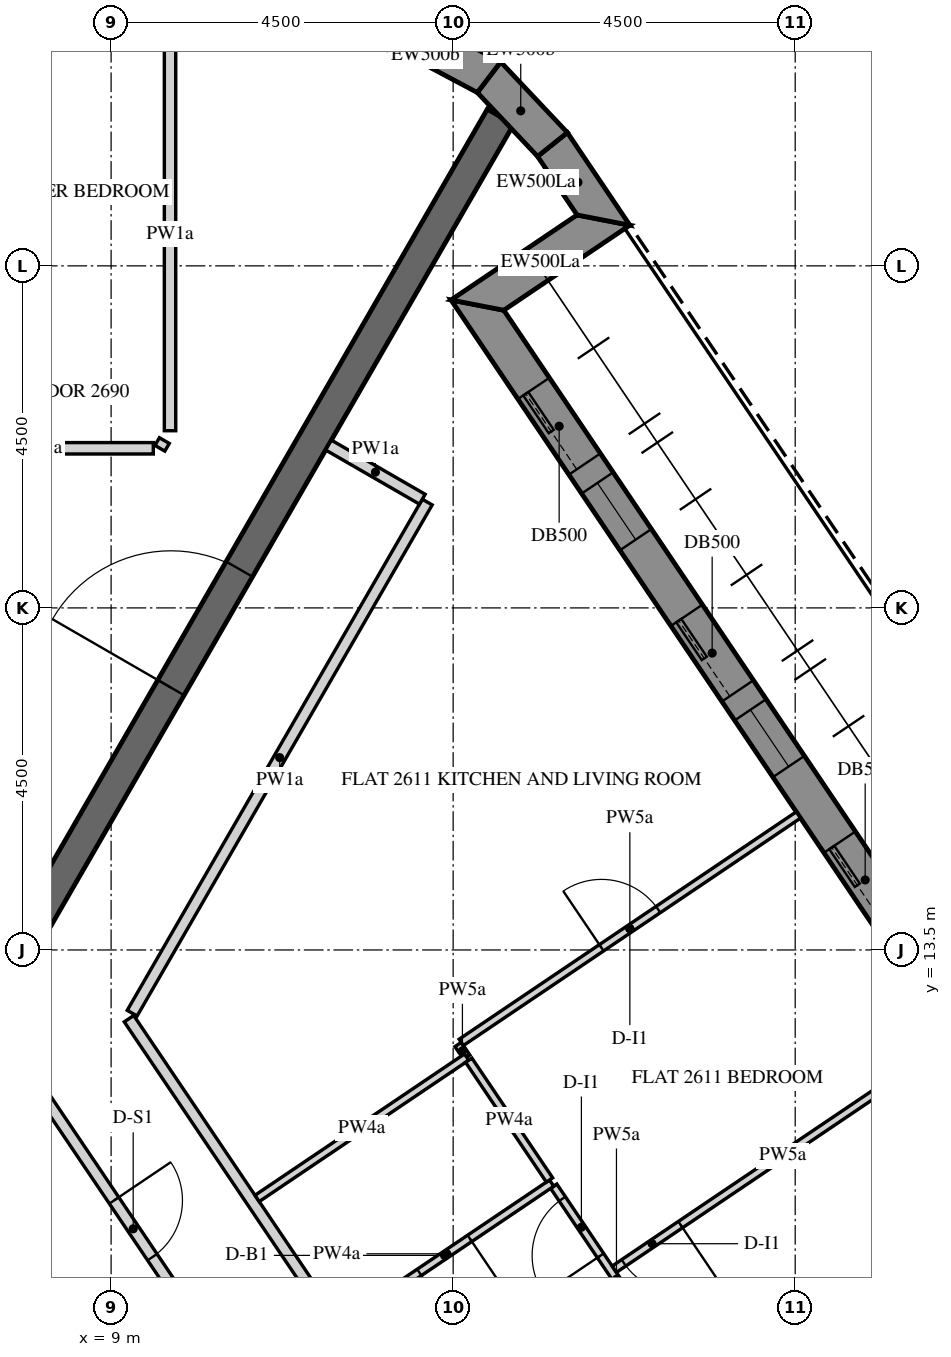
"""IFC4 building model, lengths in metres.
Left out: names, types, materials, properties, quantities, classifications, styles, units other than length and angle.
Written with IfcOpenShell. Run it as: python <this file> out.ifc"""

import sys

from ifc_helpers import new_model, si_unit, direction, frame, frame_2d, origin, place, context, subcontext, project, spatial, polyline, rectangle, outline, extrude, element, fill, save


model = new_model("IFC4")
c1 = context("Model", 3, precision=1e-05, world=origin(), true_north=direction((0.0, 1.0)))
c2 = subcontext(c1, "Body", "Model", "MODEL_VIEW")
j1 = project(units=[si_unit("LENGTHUNIT", "METRE"), si_unit("PLANEANGLEUNIT", "RADIAN")], contexts=[c1])
p1 = place(None, origin())
s1 = spatial("IfcSite", under=j1, at=p1, CompositionType="ELEMENT")
p2 = place(p1, origin())
s2 = spatial("IfcBuilding", under=s1, at=p2, CompositionType="ELEMENT")
p3 = place(p2, frame((0.0, 0.0, 334.2)))
s3 = spatial("IfcBuildingStorey", under=s2, at=p3, CompositionType="ELEMENT", Elevation=334.2)
p4 = place(p3, frame((26.706, 2.879, -0.15), z_axis=(0.0, 0.0, 1.0), x_axis=(-0.559197891507, 0.829034208061, 0.0)))
e1 = element("IfcWall", 1, at=p4, inside=s3, PredefinedType="SOLIDWALL", context=c2, shape_type="SweptSolid", body=[
    extrude(outline(polyline([(0.25, -0.25), (22.795, -0.25), (23.295, 0.25), (-0.25, 0.25), (0.25, -0.25)])), origin(), (0.0, 0.0, 1.0), 3.75),
])
p5 = place(p4, frame((1.323, 0.0, 1.05)))
e2 = element("IfcOpeningElement", 2, at=p5, cuts=e1, PredefinedType="OPENING", context=c2, shape_type="SweptSolid", body=[
    extrude(rectangle(XDim=0.9, YDim=1.5, at=frame_2d((0.45, 0.75))), frame((0.0, 0.26, 0.0), z_axis=(0.0, -1.0, 0.0), x_axis=(1.0, 0.0, 0.0)), (0.0, 0.0, 1.0), 0.52),
])
p6 = place(p4, frame((2.522, 0.0, 0.15)))
e3 = element("IfcOpeningElement", 3, at=p6, cuts=e1, PredefinedType="OPENING", context=c2, shape_type="SweptSolid", body=[
    extrude(rectangle(XDim=1.2, YDim=2.4, at=frame_2d((0.6, 1.2))), frame((0.0, 0.26, 0.0), z_axis=(0.0, -1.0, 0.0), x_axis=(1.0, 0.0, 0.0)), (0.0, 0.0, 1.0), 0.52),
])
p7 = place(p4, frame((4.922, 0.0, 1.05)))
e4 = element("IfcOpeningElement", 4, at=p7, cuts=e1, PredefinedType="OPENING", context=c2, shape_type="SweptSolid", body=[
    extrude(rectangle(XDim=0.9, YDim=1.5, at=frame_2d((0.45, 0.75))), frame((0.0, 0.26, 0.0), z_axis=(0.0, -1.0, 0.0), x_axis=(1.0, 0.0, 0.0)), (0.0, 0.0, 1.0), 0.52),
])
p8 = place(p4, frame((6.122, 0.0, 0.15)))
e5 = element("IfcOpeningElement", 5, at=p8, cuts=e1, PredefinedType="OPENING", context=c2, shape_type="SweptSolid", body=[
    extrude(rectangle(XDim=1.2, YDim=2.4, at=frame_2d((0.6, 1.2))), frame((0.0, 0.26, 0.0), z_axis=(0.0, -1.0, 0.0), x_axis=(1.0, 0.0, 0.0)), (0.0, 0.0, 1.0), 0.52),
])
p9 = place(p4, frame((8.522, 0.0, 1.05)))
e6 = element("IfcOpeningElement", 6, at=p9, cuts=e1, PredefinedType="OPENING", context=c2, shape_type="SweptSolid", body=[
    extrude(rectangle(XDim=0.9, YDim=1.5, at=frame_2d((0.45, 0.75))), frame((0.0, 0.26, 0.0), z_axis=(0.0, -1.0, 0.0), x_axis=(1.0, 0.0, 0.0)), (0.0, 0.0, 1.0), 0.52),
])
p10 = place(p4, frame((9.722, 0.0, 0.15)))
e7 = element("IfcOpeningElement", 7, at=p10, cuts=e1, PredefinedType="OPENING", context=c2, shape_type="SweptSolid", body=[
    extrude(rectangle(XDim=1.2, YDim=2.4, at=frame_2d((0.6, 1.2))), frame((0.0, 0.26, 0.0), z_axis=(0.0, -1.0, 0.0), x_axis=(1.0, 0.0, 0.0)), (0.0, 0.0, 1.0), 0.52),
])
p11 = place(p4, frame((12.122, 0.0, 1.05)))
e8 = element("IfcOpeningElement", 8, at=p11, cuts=e1, PredefinedType="OPENING", context=c2, shape_type="SweptSolid", body=[
    extrude(rectangle(XDim=0.9, YDim=1.5, at=frame_2d((0.45, 0.75))), frame((0.0, 0.26, 0.0), z_axis=(0.0, -1.0, 0.0), x_axis=(1.0, 0.0, 0.0)), (0.0, 0.0, 1.0), 0.52),
])
p12 = place(p4, frame((13.323, 0.0, 0.15)))
e9 = element("IfcOpeningElement", 9, at=p12, cuts=e1, PredefinedType="OPENING", context=c2, shape_type="SweptSolid", body=[
    extrude(rectangle(XDim=1.2, YDim=2.4, at=frame_2d((0.6, 1.2))), frame((0.0, 0.26, 0.0), z_axis=(0.0, -1.0, 0.0), x_axis=(1.0, 0.0, 0.0)), (0.0, 0.0, 1.0), 0.52),
])
p13 = place(p4, frame((15.722, 0.0, 1.05)))
e10 = element("IfcOpeningElement", 10, at=p13, cuts=e1, PredefinedType="OPENING", context=c2, shape_type="SweptSolid", body=[
    extrude(rectangle(XDim=0.9, YDim=1.5, at=frame_2d((0.45, 0.75))), frame((0.0, 0.26, 0.0), z_axis=(0.0, -1.0, 0.0), x_axis=(1.0, 0.0, 0.0)), (0.0, 0.0, 1.0), 0.52),
])
p14 = place(p4, frame((16.922, 0.0, 0.15)))
e11 = element("IfcOpeningElement", 11, at=p14, cuts=e1, PredefinedType="OPENING", context=c2, shape_type="SweptSolid", body=[
    extrude(rectangle(XDim=1.2, YDim=2.4, at=frame_2d((0.6, 1.2))), frame((0.0, 0.26, 0.0), z_axis=(0.0, -1.0, 0.0), x_axis=(1.0, 0.0, 0.0)), (0.0, 0.0, 1.0), 0.52),
])
p15 = place(p4, frame((19.323, 0.0, 1.05)))
e12 = element("IfcOpeningElement", 12, at=p15, cuts=e1, PredefinedType="OPENING", context=c2, shape_type="SweptSolid", body=[
    extrude(rectangle(XDim=0.9, YDim=1.5, at=frame_2d((0.45, 0.75))), frame((0.0, 0.26, 0.0), z_axis=(0.0, -1.0, 0.0), x_axis=(1.0, 0.0, 0.0)), (0.0, 0.0, 1.0), 0.52),
])
p16 = place(p4, frame((20.522, 0.0, 0.15)))
e13 = element("IfcOpeningElement", 13, at=p16, cuts=e1, PredefinedType="OPENING", context=c2, shape_type="SweptSolid", body=[
    extrude(rectangle(XDim=1.2, YDim=2.4, at=frame_2d((0.6, 1.2))), frame((0.0, 0.26, 0.0), z_axis=(0.0, -1.0, 0.0), x_axis=(1.0, 0.0, 0.0)), (0.0, 0.0, 1.0), 0.52),
])
p17 = place(p3, frame((13.819, 21.984, -0.15), z_axis=(0.0, 0.0, 1.0), x_axis=(0.829052389485, 0.559170935841, 0.0)))
e14 = element("IfcWall", 14, at=p17, inside=s3, PredefinedType="SOLIDWALL", context=c2, shape_type="SweptSolid", body=[
    extrude(outline(polyline([(0.25, -0.25), (2.25, -0.25), (1.75, 0.25), (-0.25, 0.25), (0.25, -0.25)])), origin(), (0.0, 0.0, 1.0), 3.75),
])
p18 = place(p3, frame((15.478, 23.102, -0.15), z_axis=(0.0, 0.0, 1.0), x_axis=(-0.559245726333, 0.829001940636, 0.0)))
e15 = element("IfcWall", 15, at=p18, inside=s3, PredefinedType="SOLIDWALL", context=c2, shape_type="SweptSolid", body=[
    extrude(outline(polyline([(-0.25, -0.25), (1.221, -0.25), (1.18, 0.25), (0.25, 0.25), (-0.25, -0.25)])), origin(), (0.0, 0.0, 1.0), 3.75),
])
p19 = place(p3, frame((14.806, 24.097, -0.15), z_axis=(0.0, 0.0, 1.0), x_axis=(-0.686234452793, 0.727380420275, 0.0)))
e16 = element("IfcWall", 16, at=p19, inside=s3, PredefinedType="SOLIDWALL", context=c2, shape_type="SweptSolid", body=[
    extrude(outline(polyline([(-0.021, -0.25), (1.257, -0.25), (1.175, 0.25), (0.021, 0.25), (-0.021, -0.25)])), origin(), (0.0, 0.0, 1.0), 3.75),
])
p20 = place(p3, frame((13.972, 24.982, -0.15), z_axis=(0.0, 0.0, 1.0), x_axis=(-0.882902492938, 0.469556373575, 0.0)))
e17 = element("IfcWall", 17, at=p20, inside=s3, PredefinedType="SOLIDWALL", context=c2, shape_type="SweptSolid", body=[
    extrude(outline(polyline([(-0.041, -0.25), (1.257, -0.25), (1.175, 0.25), (0.041, 0.25), (-0.041, -0.25)])), origin(), (0.0, 0.0, 1.0), 3.75),
])
p21 = place(p3, frame((12.471, 0.0, -0.15), z_axis=(0.0, 0.0, 1.0), x_axis=(-0.499996419489, 0.866027470984, 0.0)))
e18 = element("IfcWall", 18, at=p21, inside=s3, PredefinedType="SHEAR", context=c2, shape_type="SweptSolid", body=[
    extrude(outline(polyline([(-0.115, -0.2), (12.586, -0.2), (12.355, 0.2), (0.115, 0.2), (-0.115, -0.2)])), origin(), (0.0, 0.0, 1.0), 3.75),
])
p22 = place(p21, frame((5.306, 0.0, 0.15)))
e19 = element("IfcOpeningElement", 19, at=p22, cuts=e18, PredefinedType="OPENING", context=c2, shape_type="SweptSolid", body=[
    extrude(rectangle(XDim=1.8, YDim=2.4, at=frame_2d((0.9, 1.2))), frame((0.0, 0.21, 0.0), z_axis=(0.0, -1.0, 0.0), x_axis=(1.0, 0.0, 0.0)), (0.0, 0.0, 1.0), 0.42),
])
p23 = place(p3, frame((6.351, 11.0, -0.15), z_axis=(0.0, 0.0, 1.0), x_axis=(0.499998894578, 0.866026041999, 0.0)))
e20 = element("IfcWall", 20, at=p23, inside=s3, PredefinedType="SHEAR", context=c2, shape_type="SweptSolid", body=[
    extrude(rectangle(XDim=15.544, YDim=0.4, at=frame_2d((7.772, 0.0))), origin(), (0.0, 0.0, 1.0), 3.75),
])
p24 = place(p23, frame((6.872, 0.0, 0.15)))
e21 = element("IfcOpeningElement", 21, at=p24, cuts=e20, PredefinedType="OPENING", context=c2, shape_type="SweptSolid", body=[
    extrude(rectangle(XDim=1.8, YDim=2.4, at=frame_2d((0.9, 1.2))), frame((0.0, 0.21, 0.0), z_axis=(0.0, -1.0, 0.0), x_axis=(1.0, 0.0, 0.0)), (0.0, 0.0, 1.0), 0.42),
])
p25 = place(p3, frame((9.775, 25.5, 0.0), z_axis=(0.0, 0.0, 1.0), x_axis=(0.0, -1.0, 0.0)))
e22 = element("IfcWall", 22, at=p25, inside=s3, PredefinedType="PARTITIONING", context=c2, shape_type="SweptSolid", body=[
    extrude(rectangle(XDim=5.169, YDim=0.15, at=frame_2d((2.584, 0.0))), origin(), (0.0, 0.0, 1.0), 2.838),
])
p26 = place(p3, frame((9.7, 20.201, 0.0), z_axis=(0.0, 0.0, 1.0), x_axis=(-0.49996389635, -0.866046247233, 0.0)))
e23 = element("IfcWall", 23, at=p26, inside=s3, PredefinedType="PARTITIONING", context=c2, shape_type="SweptSolid", body=[
    extrude(rectangle(XDim=0.117, YDim=0.15, at=frame_2d((0.058, 0.0))), origin(), (0.0, 0.0, 1.0), 2.838),
])
p27 = place(p3, frame((9.555, 20.1, 0.0), z_axis=(0.0, 0.0, 1.0), x_axis=(-1.0, 0.0, 0.0)))
e24 = element("IfcWall", 24, at=p27, inside=s3, PredefinedType="PARTITIONING", context=c2, shape_type="SweptSolid", body=[
    extrude(rectangle(XDim=3.017, YDim=0.15, at=frame_2d((1.508, 0.0))), origin(), (0.0, 0.0, 1.0), 2.838),
])
p28 = place(p3, frame((18.521, -1.171, 0.0), z_axis=(0.0, 0.0, 1.0), x_axis=(-0.559191021435, 0.829038842001, 0.0)))
e25 = element("IfcWall", 25, at=p28, inside=s3, PredefinedType="PARTITIONING", context=c2, shape_type="SweptSolid", body=[
    extrude(rectangle(XDim=16.605, YDim=0.15, at=frame_2d((8.303, 0.0))), origin(), (0.0, 0.0, 1.0), 2.838),
])
p29 = place(p28, frame((9.703, 0.0, 0.0)))
e26 = element("IfcOpeningElement", 26, at=p29, cuts=e25, PredefinedType="OPENING", context=c2, shape_type="SweptSolid", body=[
    extrude(rectangle(XDim=1.0, YDim=2.1, at=frame_2d((0.5, 1.05))), frame((0.0, 0.085, 0.0), z_axis=(0.0, -1.0, 0.0), x_axis=(1.0, 0.0, 0.0)), (0.0, 0.0, 1.0), 0.17),
])
p30 = place(p3, frame((9.277, 12.668, 0.0), z_axis=(0.0, 0.0, 1.0), x_axis=(0.499991012162, 0.866030592853, 0.0)))
e27 = element("IfcWall", 27, at=p30, inside=s3, PredefinedType="PARTITIONING", context=c2, shape_type="SweptSolid", body=[
    extrude(rectangle(XDim=7.764, YDim=0.15, at=frame_2d((3.882, 0.0))), origin(), (0.0, 0.0, 1.0), 2.838),
])
p31 = place(p3, frame((13.094, 19.43, 0.0), z_axis=(0.0, 0.0, 1.0), x_axis=(-0.866062911188, 0.499935029643, 0.0)))
e28 = element("IfcWall", 28, at=p31, inside=s3, PredefinedType="PARTITIONING", context=c2, shape_type="SweptSolid", body=[
    extrude(rectangle(XDim=1.425, YDim=0.15, at=frame_2d((0.712, 0.0))), origin(), (0.0, 0.0, 1.0), 2.838),
])
p32 = place(p3, frame((7.694, 12.199, 0.0), z_axis=(0.0, 0.0, 1.0), x_axis=(0.55920112739, -0.829032025392, 0.0)))
e29 = element("IfcWall", 29, at=p32, inside=s3, PredefinedType="PARTITIONING", context=c2, shape_type="SweptSolid", body=[
    extrude(rectangle(XDim=5.71, YDim=0.15, at=frame_2d((2.855, 0.0))), origin(), (0.0, 0.0, 1.0), 2.838),
])
p33 = place(p32, frame((2.405, 0.0, 0.0)))
e30 = element("IfcOpeningElement", 30, at=p33, cuts=e29, PredefinedType="OPENING", context=c2, shape_type="SweptSolid", body=[
    extrude(rectangle(XDim=0.9, YDim=2.1, at=frame_2d((0.45, 1.05))), frame((0.0, 0.085, 0.0), z_axis=(0.0, -1.0, 0.0), x_axis=(1.0, 0.0, 0.0)), (0.0, 0.0, 1.0), 0.17),
])
p34 = place(p3, frame((22.069, 9.307, 0.0), z_axis=(0.0, 0.0, 1.0), x_axis=(-0.829040270775, -0.559188903174, 0.0)))
e31 = element("IfcWall", 31, at=p34, inside=s3, PredefinedType="PARTITIONING", context=c2, shape_type="SweptSolid", body=[
    extrude(rectangle(XDim=8.758, YDim=0.18, at=frame_2d((4.379, 0.0))), origin(), (0.0, 0.0, 1.0), 2.838),
])
p35 = place(p3, frame((13.678, 12.089, 0.0), z_axis=(0.0, 0.0, 1.0), x_axis=(-0.559431350648, 0.828876688001, 0.0)))
e32 = element("IfcWall", 32, at=p35, inside=s3, PredefinedType="PARTITIONING", context=c2, shape_type="SweptSolid", body=[
    extrude(rectangle(XDim=0.202, YDim=0.1, at=frame_2d((0.101, 0.0))), origin(), (0.0, 0.0, 1.0), 2.838),
])
p36 = place(p3, frame((13.607, 12.284, 0.0), z_axis=(0.0, 0.0, 1.0), x_axis=(0.829033261565, 0.559199294722, 0.0)))
e33 = element("IfcWall", 33, at=p36, inside=s3, PredefinedType="PARTITIONING", context=c2, shape_type="SweptSolid", body=[
    extrude(rectangle(XDim=5.35, YDim=0.1, at=frame_2d((2.675, 0.0))), origin(), (0.0, 0.0, 1.0), 2.838),
])
p37 = place(p36, frame((2.225, 0.0, 0.0)))
e34 = element("IfcOpeningElement", 34, at=p37, cuts=e33, PredefinedType="OPENING", context=c2, shape_type="SweptSolid", body=[
    extrude(rectangle(XDim=0.9, YDim=2.1, at=frame_2d((0.45, 1.05))), frame((0.0, 0.06, 0.0), z_axis=(0.0, -1.0, 0.0), x_axis=(1.0, 0.0, 0.0)), (0.0, 0.0, 1.0), 0.12),
])
p38 = place(p3, frame((10.921, 10.231, 0.0), z_axis=(0.0, 0.0, 1.0), x_axis=(0.829010378124, 0.559233218759, 0.0)))
e35 = element("IfcWall", 35, at=p38, inside=s3, PredefinedType="PARTITIONING", context=c2, shape_type="SweptSolid", body=[
    extrude(rectangle(XDim=3.325, YDim=0.1, at=frame_2d((1.663, 0.0))), origin(), (0.0, 0.0, 1.0), 2.838),
])
p39 = place(p3, frame((16.474, 7.944, 0.0), z_axis=(0.0, 0.0, 1.0), x_axis=(-0.559193191328, 0.829037378393, 0.0)))
e36 = element("IfcWall", 36, at=p39, inside=s3, PredefinedType="PARTITIONING", context=c2, shape_type="SweptSolid", body=[
    extrude(rectangle(XDim=2.954, YDim=0.1, at=frame_2d((1.477, 0.0))), origin(), (0.0, 0.0, 1.0), 2.838),
])
p40 = place(p39, frame((0.502, 0.0, 0.0)))
e37 = element("IfcOpeningElement", 37, at=p40, cuts=e36, PredefinedType="OPENING", context=c2, shape_type="SweptSolid", body=[
    extrude(rectangle(XDim=0.9, YDim=2.1, at=frame_2d((0.45, 1.05))), frame((0.0, 0.06, 0.0), z_axis=(0.0, -1.0, 0.0), x_axis=(1.0, 0.0, 0.0)), (0.0, 0.0, 1.0), 0.12),
])
p41 = place(p39, frame((1.852, 0.0, 0.0)))
e38 = element("IfcOpeningElement", 38, at=p41, cuts=e36, PredefinedType="OPENING", context=c2, shape_type="SweptSolid", body=[
    extrude(rectangle(XDim=0.9, YDim=2.1, at=frame_2d((0.45, 1.05))), frame((0.0, 0.06, 0.0), z_axis=(0.0, -1.0, 0.0), x_axis=(1.0, 0.0, 0.0)), (0.0, 0.0, 1.0), 0.12),
])
p42 = place(p3, frame((14.796, 10.433, 0.0), z_axis=(0.0, 0.0, 1.0), x_axis=(-0.82903334026, -0.559199178055, 0.0)))
e39 = element("IfcWall", 39, at=p42, inside=s3, PredefinedType="PARTITIONING", context=c2, shape_type="SweptSolid", body=[
    extrude(rectangle(XDim=3.325, YDim=0.1, at=frame_2d((1.663, 0.0))), origin(), (0.0, 0.0, 1.0), 2.838),
])
p43 = place(p42, frame((1.3, 0.0, 0.0)))
e40 = element("IfcOpeningElement", 40, at=p43, cuts=e39, PredefinedType="OPENING", context=c2, shape_type="SweptSolid", body=[
    extrude(rectangle(XDim=0.8, YDim=2.1, at=frame_2d((0.4, 1.05))), frame((0.0, 0.06, 0.0), z_axis=(0.0, -1.0, 0.0), x_axis=(1.0, 0.0, 0.0)), (0.0, 0.0, 1.0), 0.12),
])
p44 = place(p3, frame((20.055, 12.292, 0.0), z_axis=(0.0, 0.0, 1.0), x_axis=(-0.829033261565, -0.559199294722, 0.0)))
e41 = element("IfcWall", 41, at=p44, inside=s3, PredefinedType="PARTITIONING", context=c2, shape_type="SweptSolid", body=[
    extrude(rectangle(XDim=5.35, YDim=0.1, at=frame_2d((2.675, 0.0))), origin(), (0.0, 0.0, 1.0), 2.838),
])
p45 = place(p44, frame((4.3, 0.0, 0.0)))
e42 = element("IfcOpeningElement", 42, at=p45, cuts=e41, PredefinedType="OPENING", context=c2, shape_type="SweptSolid", body=[
    extrude(rectangle(XDim=0.9, YDim=2.1, at=frame_2d((0.45, 1.05))), frame((0.0, 0.06, 0.0), z_axis=(0.0, -1.0, 0.0), x_axis=(1.0, 0.0, 0.0)), (0.0, 0.0, 1.0), 0.12),
])
p46 = place(p3, frame((13.705, 12.049, 0.0), z_axis=(0.0, 0.0, 1.0), x_axis=(0.559199178055, -0.82903334026, 0.0)))
e43 = element("IfcWall", 43, at=p46, inside=s3, PredefinedType="PARTITIONING", context=c2, shape_type="SweptSolid", body=[
    extrude(rectangle(XDim=1.9, YDim=0.1, at=frame_2d((0.95, 0.0))), origin(), (0.0, 0.0, 1.0), 2.838),
])
p47 = place(p12, frame((0.0, 0.175, 0.0)))
e44 = element("IfcDoor", 44, at=p47, inside=s3, OperationType="SLIDING_TO_LEFT", PredefinedType="DOOR", context=c2, shape_type="SweptSolid", body=[
    extrude(rectangle(XDim=1.2, YDim=2.4, at=frame_2d((0.6, 1.2))), frame((0.0, 0.025, 0.0), z_axis=(0.0, -1.0, 0.0), x_axis=(1.0, 0.0, 0.0)), (0.0, 0.0, 1.0), 0.05),
])
fill(e9, e44)
p48 = place(p13, frame((0.0, 0.18, 0.0)))
e45 = element("IfcWindow", 45, at=p48, inside=s3, PartitioningType="SINGLE_PANEL", PredefinedType="WINDOW", context=c2, shape_type="SweptSolid", body=[
    extrude(rectangle(XDim=0.9, YDim=1.5, at=frame_2d((0.45, 0.75))), frame((0.0, 0.03, 0.0), z_axis=(0.0, -1.0, 0.0), x_axis=(1.0, 0.0, 0.0)), (0.0, 0.0, 1.0), 0.06),
])
fill(e10, e45)
p49 = place(p14, frame((0.0, 0.175, 0.0)))
e46 = element("IfcDoor", 46, at=p49, inside=s3, OperationType="SLIDING_TO_LEFT", PredefinedType="DOOR", context=c2, shape_type="SweptSolid", body=[
    extrude(rectangle(XDim=1.2, YDim=2.4, at=frame_2d((0.6, 1.2))), frame((0.0, 0.025, 0.0), z_axis=(0.0, -1.0, 0.0), x_axis=(1.0, 0.0, 0.0)), (0.0, 0.0, 1.0), 0.05),
])
fill(e11, e46)
p50 = place(p15, frame((0.0, 0.18, 0.0)))
e47 = element("IfcWindow", 47, at=p50, inside=s3, PartitioningType="SINGLE_PANEL", PredefinedType="WINDOW", context=c2, shape_type="SweptSolid", body=[
    extrude(rectangle(XDim=0.9, YDim=1.5, at=frame_2d((0.45, 0.75))), frame((0.0, 0.03, 0.0), z_axis=(0.0, -1.0, 0.0), x_axis=(1.0, 0.0, 0.0)), (0.0, 0.0, 1.0), 0.06),
])
fill(e12, e47)
p51 = place(p16, frame((0.0, 0.175, 0.0)))
e48 = element("IfcDoor", 48, at=p51, inside=s3, OperationType="SLIDING_TO_LEFT", PredefinedType="DOOR", context=c2, shape_type="SweptSolid", body=[
    extrude(rectangle(XDim=1.2, YDim=2.4, at=frame_2d((0.6, 1.2))), frame((0.0, 0.025, 0.0), z_axis=(0.0, -1.0, 0.0), x_axis=(1.0, 0.0, 0.0)), (0.0, 0.0, 1.0), 0.05),
])
fill(e13, e48)
p52 = place(p24, origin())
e49 = element("IfcDoor", 49, at=p52, inside=s3, OperationType="DOUBLE_DOOR_SINGLE_SWING", PredefinedType="DOOR", context=c2, shape_type="SweptSolid", body=[
    extrude(rectangle(XDim=1.8, YDim=2.4, at=frame_2d((0.9, 1.2))), frame((0.0, 0.025, 0.0), z_axis=(0.0, -1.0, 0.0), x_axis=(1.0, 0.0, 0.0)), (0.0, 0.0, 1.0), 0.05),
])
fill(e21, e49)
p53 = place(p45, origin())
e50 = element("IfcDoor", 50, at=p53, inside=s3, OperationType="SINGLE_SWING_RIGHT", PredefinedType="DOOR", context=c2, shape_type="SweptSolid", body=[
    extrude(rectangle(XDim=0.9, YDim=2.1, at=frame_2d((0.45, 1.05))), frame((0.0, 0.025, 0.0), z_axis=(0.0, -1.0, 0.0), x_axis=(1.0, 0.0, 0.0)), (0.0, 0.0, 1.0), 0.05),
])
fill(e42, e50)
p54 = place(p41, origin())
e51 = element("IfcDoor", 51, at=p54, inside=s3, OperationType="SINGLE_SWING_RIGHT", PredefinedType="DOOR", context=c2, shape_type="SweptSolid", body=[
    extrude(rectangle(XDim=0.9, YDim=2.1, at=frame_2d((0.45, 1.05))), frame((0.0, 0.025, 0.0), z_axis=(0.0, -1.0, 0.0), x_axis=(1.0, 0.0, 0.0)), (0.0, 0.0, 1.0), 0.05),
])
fill(e38, e51)
p55 = place(p43, origin())
e52 = element("IfcDoor", 52, at=p55, inside=s3, OperationType="SINGLE_SWING_LEFT", PredefinedType="DOOR", context=c2, shape_type="SweptSolid", body=[
    extrude(rectangle(XDim=0.8, YDim=2.1, at=frame_2d((0.4, 1.05))), frame((0.0, 0.025, 0.0), z_axis=(0.0, -1.0, 0.0), x_axis=(1.0, 0.0, 0.0)), (0.0, 0.0, 1.0), 0.05),
])
fill(e40, e52)
p56 = place(p37, origin())
e53 = element("IfcDoor", 53, at=p56, inside=s3, OperationType="SINGLE_SWING_RIGHT", PredefinedType="DOOR", context=c2, shape_type="SweptSolid", body=[
    extrude(rectangle(XDim=0.9, YDim=2.1, at=frame_2d((0.45, 1.05))), frame((0.0, 0.025, 0.0), z_axis=(0.0, -1.0, 0.0), x_axis=(1.0, 0.0, 0.0)), (0.0, 0.0, 1.0), 0.05),
])
fill(e34, e53)
p57 = place(p33, origin())
e54 = element("IfcDoor", 54, at=p57, inside=s3, OperationType="SINGLE_SWING_RIGHT", PredefinedType="DOOR", context=c2, shape_type="SweptSolid", body=[
    extrude(rectangle(XDim=0.9, YDim=2.1, at=frame_2d((0.45, 1.05))), frame((0.0, 0.025, 0.0), z_axis=(0.0, -1.0, 0.0), x_axis=(1.0, 0.0, 0.0)), (0.0, 0.0, 1.0), 0.05),
])
fill(e30, e54)
save(model, sys.argv[1])
